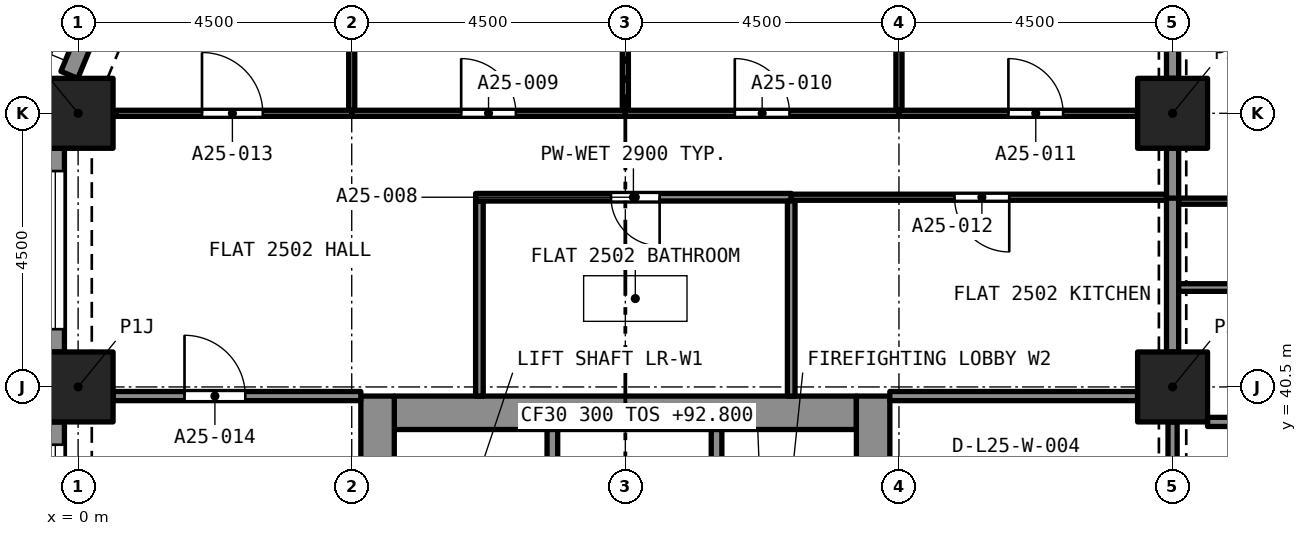
"""IFC4 building model, lengths in metres.
Left out: names, types, materials, properties, quantities, classifications, styles, units other than length and angle.
Written with IfcOpenShell. Run it as: python <this file> out.ifc"""

import sys

from ifc_helpers import new_model, si_unit, direction, frame, frame_2d, origin, origin_2d, place, context, subcontext, project, spatial, rectangle, extrude, element, fill, save


model = new_model("IFC4")
c1 = context("Model", 3, precision=1e-05, world=origin(), true_north=direction((0.0, 1.0)))
c2 = subcontext(c1, "Body", "Model", "MODEL_VIEW")
j1 = project(units=[si_unit("LENGTHUNIT", "METRE"), si_unit("PLANEANGLEUNIT", "RADIAN")], contexts=[c1])
p1 = place(None, origin())
s1 = spatial("IfcSite", under=j1, at=p1, CompositionType="ELEMENT")
p2 = place(p1, origin())
s2 = spatial("IfcBuilding", under=s1, at=p2, CompositionType="ELEMENT")
p3 = place(p2, frame((0.0, 0.0, 92.8)))
s3 = spatial("IfcBuildingStorey", under=s2, at=p3, CompositionType="ELEMENT", Elevation=92.8)
for number, where, z_axis, x_axis in (
    (1, (0.0, 40.5, 0.0), (0.0, 0.0, 1.0), (1.0, 0.0, 0.0)),
    (2, (18.0, 40.5, 0.0), (0.0, 0.0, 1.0), (1.0, 0.0, 0.0)),
    (3, (0.0, 45.0, 0.0), (0.0, 0.0, 1.0), (1.0, 0.0, 0.0)),
    (4, (18.0, 45.0, 0.0), (0.0, 0.0, 1.0), (1.0, 0.0, 0.0)),
):
    element("IfcColumn", number, at=place(p3, frame(where, z_axis=z_axis, x_axis=x_axis)), inside=s3, PredefinedType="COLUMN", context=c2, shape_type="SweptSolid", body=[
        extrude(rectangle(XDim=1.15, YDim=1.15, at=origin_2d()), origin(), (0.0, 0.0, 1.0), 3.2),
    ])
p4 = place(p3, frame((5.2, 40.075, 0.0), z_axis=(0.0, 0.0, 1.0), x_axis=(1.0, 0.0, 0.0)))
e5 = element("IfcWall", 5, at=p4, inside=s3, PredefinedType="SOLIDWALL", context=c2, shape_type="SweptSolid", body=[
    extrude(rectangle(XDim=7.6, YDim=0.55, at=frame_2d((3.8, 0.0))), origin(), (0.0, 0.0, 1.0), 3.2),
])
p5 = place(p3, frame((4.925, 27.15, 0.0), z_axis=(0.0, 0.0, 1.0), x_axis=(0.0, 1.0, 0.0)))
e6 = element("IfcWall", 6, at=p5, inside=s3, PredefinedType="SOLIDWALL", context=c2, shape_type="SweptSolid", body=[
    extrude(rectangle(XDim=13.2, YDim=0.55, at=frame_2d((6.6, 0.0))), origin(), (0.0, 0.0, 1.0), 3.2),
])
p6 = place(p5, frame((8.8, 0.0, 0.0)))
e7 = element("IfcOpeningElement", 7, at=p6, cuts=e6, PredefinedType="OPENING", context=c2, shape_type="SweptSolid", body=[
    extrude(rectangle(XDim=1.2, YDim=2.1, at=frame_2d((0.6, 1.05))), frame((0.0, 0.285, 0.0), z_axis=(0.0, -1.0, 0.0), x_axis=(1.0, 0.0, 0.0)), (0.0, 0.0, 1.0), 0.57),
])
p7 = place(p3, frame((13.075, 27.15, 0.0), z_axis=(0.0, 0.0, 1.0), x_axis=(0.0, 1.0, 0.0)))
e8 = element("IfcWall", 8, at=p7, inside=s3, PredefinedType="SOLIDWALL", context=c2, shape_type="SweptSolid", body=[
    extrude(rectangle(XDim=13.2, YDim=0.55, at=frame_2d((6.6, 0.0))), origin(), (0.0, 0.0, 1.0), 3.2),
])
p8 = place(p7, frame((10.95, 0.0, 0.0)))
e9 = element("IfcOpeningElement", 9, at=p8, cuts=e8, PredefinedType="OPENING", context=c2, shape_type="SweptSolid", body=[
    extrude(rectangle(XDim=1.1, YDim=2.1, at=frame_2d((0.55, 1.05))), frame((0.0, 0.285, 0.0), z_axis=(0.0, -1.0, 0.0), x_axis=(1.0, 0.0, 0.0)), (0.0, 0.0, 1.0), 0.57),
])
p9 = place(p7, frame((8.8, 0.0, 0.0)))
e10 = element("IfcOpeningElement", 10, at=p9, cuts=e8, PredefinedType="OPENING", context=c2, shape_type="SweptSolid", body=[
    extrude(rectangle(XDim=1.2, YDim=2.1, at=frame_2d((0.6, 1.05))), frame((0.0, 0.285, 0.0), z_axis=(0.0, -1.0, 0.0), x_axis=(1.0, 0.0, 0.0)), (0.0, 0.0, 1.0), 0.57),
])
p10 = place(p3, frame((-0.144, 45.632, 0.0), z_axis=(0.0, 0.0, 1.0), x_axis=(0.382723818695, 0.923862802911, 0.0)))
e11 = element("IfcWall", 11, at=p10, inside=s3, PredefinedType="SOLIDWALL", context=c2, shape_type="SweptSolid", body=[
    extrude(rectangle(XDim=2.164, YDim=0.3, at=frame_2d((1.082, 0.0))), origin(), (0.0, 0.0, 1.0), 3.2),
])
p11 = place(p10, frame((0.493, 0.0, 0.45)))
e12 = element("IfcOpeningElement", 12, at=p11, cuts=e11, PredefinedType="OPENING", context=c2, shape_type="SweptSolid", body=[
    extrude(rectangle(XDim=1.4, YDim=1.95, at=frame_2d((0.7, 0.975))), frame((0.0, 0.16, 0.0), z_axis=(0.0, -1.0, 0.0), x_axis=(1.0, 0.0, 0.0)), (0.0, 0.0, 1.0), 0.32),
])
p12 = place(p3, frame((-0.375, 41.075, 0.0), z_axis=(0.0, 0.0, 1.0), x_axis=(0.0, 1.0, 0.0)))
e13 = element("IfcWall", 13, at=p12, inside=s3, PredefinedType="SOLIDWALL", context=c2, shape_type="SweptSolid", body=[
    extrude(rectangle(XDim=3.35, YDim=0.3, at=frame_2d((1.675, 0.0))), origin(), (0.0, 0.0, 1.0), 3.2),
])
p13 = place(p12, frame((0.375, 0.0, 0.45)))
e14 = element("IfcOpeningElement", 14, at=p13, cuts=e13, PredefinedType="OPENING", context=c2, shape_type="SweptSolid", body=[
    extrude(rectangle(XDim=2.6, YDim=1.95, at=frame_2d((1.3, 0.975))), frame((0.0, 0.16, 0.0), z_axis=(0.0, -1.0, 0.0), x_axis=(1.0, 0.0, 0.0)), (0.0, 0.0, 1.0), 0.32),
])
p14 = place(p3, frame((-0.375, 36.575, 0.0), z_axis=(0.0, 0.0, 1.0), x_axis=(0.0, 1.0, 0.0)))
e15 = element("IfcWall", 15, at=p14, inside=s3, PredefinedType="SOLIDWALL", context=c2, shape_type="SweptSolid", body=[
    extrude(rectangle(XDim=3.35, YDim=0.3, at=frame_2d((1.675, 0.0))), origin(), (0.0, 0.0, 1.0), 3.2),
])
p15 = place(p14, frame((0.375, 0.0, 0.45)))
e16 = element("IfcOpeningElement", 16, at=p15, cuts=e15, PredefinedType="OPENING", context=c2, shape_type="SweptSolid", body=[
    extrude(rectangle(XDim=2.6, YDim=1.95, at=frame_2d((1.3, 0.975))), frame((0.0, 0.16, 0.0), z_axis=(0.0, -1.0, 0.0), x_axis=(1.0, 0.0, 0.0)), (0.0, 0.0, 1.0), 0.32),
])
p16 = place(p3, frame((6.6, 40.35, 0.0), z_axis=(0.0, 0.0, 1.0), x_axis=(0.0, 1.0, 0.0)))
e17 = element("IfcWall", 17, at=p16, inside=s3, PredefinedType="PARTITIONING", context=c2, shape_type="SweptSolid", body=[
    extrude(rectangle(XDim=3.208, YDim=0.125, at=frame_2d((1.604, 0.0))), origin(), (0.0, 0.0, 1.0), 2.9),
])
p17 = place(p3, frame((11.728, 43.62, 0.0), z_axis=(0.0, 0.0, 1.0), x_axis=(-1.0, 0.0, 0.0)))
e18 = element("IfcWall", 18, at=p17, inside=s3, PredefinedType="PARTITIONING", context=c2, shape_type="SweptSolid", body=[
    extrude(rectangle(XDim=5.19, YDim=0.125, at=frame_2d((2.595, 0.0))), origin(), (0.0, 0.0, 1.0), 2.9),
])
p18 = place(p17, frame((2.164, 0.0, 0.0)))
e19 = element("IfcOpeningElement", 19, at=p18, cuts=e18, PredefinedType="OPENING", context=c2, shape_type="SweptSolid", body=[
    extrude(rectangle(XDim=0.8, YDim=2.1, at=frame_2d((0.4, 1.05))), frame((0.0, 0.073, 0.0), z_axis=(0.0, -1.0, 0.0), x_axis=(1.0, 0.0, 0.0)), (0.0, 0.0, 1.0), 0.145),
])
p19 = place(p3, frame((11.728, 40.35, 0.0), z_axis=(0.0, 0.0, 1.0), x_axis=(0.0, 1.0, 0.0)))
e20 = element("IfcWall", 20, at=p19, inside=s3, PredefinedType="PARTITIONING", context=c2, shape_type="SweptSolid", body=[
    extrude(rectangle(XDim=3.208, YDim=0.125, at=frame_2d((1.604, 0.0))), origin(), (0.0, 0.0, 1.0), 2.9),
])
p20 = place(p3, frame((9.0, 45.05, 0.0), z_axis=(0.0, 0.0, 1.0), x_axis=(0.0, 1.0, 0.0)))
e21 = element("IfcWall", 21, at=p20, inside=s3, PredefinedType="PARTITIONING", context=c2, shape_type="SweptSolid", body=[
    extrude(rectangle(XDim=3.875, YDim=0.1, at=frame_2d((1.938, 0.0))), origin(), (0.0, 0.0, 1.0), 2.9),
])
p21 = place(p3, frame((4.5, 45.0, 0.0), z_axis=(0.0, 0.0, 1.0), x_axis=(1.0, 0.0, 0.0)))
e22 = element("IfcWall", 22, at=p21, inside=s3, PredefinedType="PARTITIONING", context=c2, shape_type="SweptSolid", body=[
    extrude(rectangle(XDim=4.5, YDim=0.1, at=frame_2d((2.25, 0.0))), origin(), (0.0, 0.0, 1.0), 2.9),
])
p22 = place(p21, frame((1.8, 0.0, 0.0)))
e23 = element("IfcOpeningElement", 23, at=p22, cuts=e22, PredefinedType="OPENING", context=c2, shape_type="SweptSolid", body=[
    extrude(rectangle(XDim=0.9, YDim=2.1, at=frame_2d((0.45, 1.05))), frame((0.0, 0.06, 0.0), z_axis=(0.0, -1.0, 0.0), x_axis=(1.0, 0.0, 0.0)), (0.0, 0.0, 1.0), 0.12),
])
p23 = place(p3, frame((4.5, 45.05, 0.0), z_axis=(0.0, 0.0, 1.0), x_axis=(0.0, 1.0, 0.0)))
e24 = element("IfcWall", 24, at=p23, inside=s3, PredefinedType="PARTITIONING", context=c2, shape_type="SweptSolid", body=[
    extrude(rectangle(XDim=3.828, YDim=0.1, at=frame_2d((1.914, 0.0))), origin(), (0.0, 0.0, 1.0), 2.9),
])
p24 = place(p3, frame((13.5, 45.05, 0.0), z_axis=(0.0, 0.0, 1.0), x_axis=(0.0, 1.0, 0.0)))
e25 = element("IfcWall", 25, at=p24, inside=s3, PredefinedType="PARTITIONING", context=c2, shape_type="SweptSolid", body=[
    extrude(rectangle(XDim=3.875, YDim=0.1, at=frame_2d((1.938, 0.0))), origin(), (0.0, 0.0, 1.0), 2.9),
])
p25 = place(p3, frame((9.0, 45.0, 0.0), z_axis=(0.0, 0.0, 1.0), x_axis=(1.0, 0.0, 0.0)))
e26 = element("IfcWall", 26, at=p25, inside=s3, PredefinedType="PARTITIONING", context=c2, shape_type="SweptSolid", body=[
    extrude(rectangle(XDim=4.5, YDim=0.1, at=frame_2d((2.25, 0.0))), origin(), (0.0, 0.0, 1.0), 2.9),
])
p26 = place(p25, frame((1.8, 0.0, 0.0)))
e27 = element("IfcOpeningElement", 27, at=p26, cuts=e26, PredefinedType="OPENING", context=c2, shape_type="SweptSolid", body=[
    extrude(rectangle(XDim=0.9, YDim=2.1, at=frame_2d((0.45, 1.05))), frame((0.0, 0.06, 0.0), z_axis=(0.0, -1.0, 0.0), x_axis=(1.0, 0.0, 0.0)), (0.0, 0.0, 1.0), 0.12),
])
p27 = place(p3, frame((13.5, 45.0, 0.0), z_axis=(0.0, 0.0, 1.0), x_axis=(1.0, 0.0, 0.0)))
e28 = element("IfcWall", 28, at=p27, inside=s3, PredefinedType="PARTITIONING", context=c2, shape_type="SweptSolid", body=[
    extrude(rectangle(XDim=3.925, YDim=0.1, at=frame_2d((1.962, 0.0))), origin(), (0.0, 0.0, 1.0), 2.9),
])
p28 = place(p27, frame((1.8, 0.0, 0.0)))
e29 = element("IfcOpeningElement", 29, at=p28, cuts=e28, PredefinedType="OPENING", context=c2, shape_type="SweptSolid", body=[
    extrude(rectangle(XDim=0.9, YDim=2.1, at=frame_2d((0.45, 1.05))), frame((0.0, 0.06, 0.0), z_axis=(0.0, -1.0, 0.0), x_axis=(1.0, 0.0, 0.0)), (0.0, 0.0, 1.0), 0.12),
])
p29 = place(p3, frame((18.0, 45.575, 0.0), z_axis=(0.0, 0.0, 1.0), x_axis=(0.0, 1.0, 0.0)))
e30 = element("IfcWall", 30, at=p29, inside=s3, PredefinedType="PARTITIONING", context=c2, shape_type="SweptSolid", body=[
    extrude(rectangle(XDim=3.35, YDim=0.2, at=frame_2d((1.675, 0.0))), origin(), (0.0, 0.0, 1.0), 2.38),
])
p30 = place(p3, frame((17.9, 43.62, 0.0), z_axis=(0.0, 0.0, 1.0), x_axis=(-1.0, 0.0, 0.0)))
e31 = element("IfcWall", 31, at=p30, inside=s3, PredefinedType="PARTITIONING", context=c2, shape_type="SweptSolid", body=[
    extrude(rectangle(XDim=6.172, YDim=0.1, at=frame_2d((3.086, 0.0))), origin(), (0.0, 0.0, 1.0), 2.9),
])
p31 = place(p30, frame((2.586, 0.0, 0.0)))
e32 = element("IfcOpeningElement", 32, at=p31, cuts=e31, PredefinedType="OPENING", context=c2, shape_type="SweptSolid", body=[
    extrude(rectangle(XDim=0.9, YDim=2.1, at=frame_2d((0.45, 1.05))), frame((0.0, 0.06, 0.0), z_axis=(0.0, -1.0, 0.0), x_axis=(1.0, 0.0, 0.0)), (0.0, 0.0, 1.0), 0.12),
])
p32 = place(p3, frame((0.622, 45.0, 0.0), z_axis=(0.0, 0.0, 1.0), x_axis=(1.0, 0.0, 0.0)))
e33 = element("IfcWall", 33, at=p32, inside=s3, PredefinedType="PARTITIONING", context=c2, shape_type="SweptSolid", body=[
    extrude(rectangle(XDim=3.878, YDim=0.1, at=frame_2d((1.939, 0.0))), origin(), (0.0, 0.0, 1.0), 2.9),
])
p33 = place(p32, frame((1.415, 0.0, 0.0)))
e34 = element("IfcOpeningElement", 34, at=p33, cuts=e33, PredefinedType="OPENING", context=c2, shape_type="SweptSolid", body=[
    extrude(rectangle(XDim=1.0, YDim=2.1, at=frame_2d((0.5, 1.05))), frame((0.0, 0.06, 0.0), z_axis=(0.0, -1.0, 0.0), x_axis=(1.0, 0.0, 0.0)), (0.0, 0.0, 1.0), 0.12),
])
p34 = place(p3, frame((18.0, 43.57, 0.0), z_axis=(0.0, 0.0, 1.0), x_axis=(0.0, 1.0, 0.0)))
e35 = element("IfcWall", 35, at=p34, inside=s3, PredefinedType="PARTITIONING", context=c2, shape_type="SweptSolid", body=[
    extrude(rectangle(XDim=0.855, YDim=0.2, at=frame_2d((0.427, 0.0))), origin(), (0.0, 0.0, 1.0), 2.38),
])
p35 = place(p3, frame((0.575, 40.35, 0.0), z_axis=(0.0, 0.0, 1.0), x_axis=(1.0, 0.0, 0.0)))
e36 = element("IfcWall", 36, at=p35, inside=s3, PredefinedType="PARTITIONING", context=c2, shape_type="SweptSolid", body=[
    extrude(rectangle(XDim=4.075, YDim=0.15, at=frame_2d((2.038, 0.0))), origin(), (0.0, 0.0, 1.0), 2.9),
])
p36 = place(p35, frame((1.175, 0.0, 0.0)))
e37 = element("IfcOpeningElement", 37, at=p36, cuts=e36, PredefinedType="OPENING", context=c2, shape_type="SweptSolid", body=[
    extrude(rectangle(XDim=1.0, YDim=2.1, at=frame_2d((0.5, 1.05))), frame((0.0, 0.085, 0.0), z_axis=(0.0, -1.0, 0.0), x_axis=(1.0, 0.0, 0.0)), (0.0, 0.0, 1.0), 0.17),
])
p37 = place(p3, frame((18.0, 41.075, 0.0), z_axis=(0.0, 0.0, 1.0), x_axis=(0.0, 1.0, 0.0)))
e38 = element("IfcWall", 38, at=p37, inside=s3, PredefinedType="PARTITIONING", context=c2, shape_type="SweptSolid", body=[
    extrude(rectangle(XDim=2.53, YDim=0.2, at=frame_2d((1.265, 0.0))), origin(), (0.0, 0.0, 1.0), 2.38),
])
p38 = place(p3, frame((13.35, 40.35, 0.0), z_axis=(0.0, 0.0, 1.0), x_axis=(1.0, 0.0, 0.0)))
e39 = element("IfcWall", 39, at=p38, inside=s3, PredefinedType="PARTITIONING", context=c2, shape_type="SweptSolid", body=[
    extrude(rectangle(XDim=4.075, YDim=0.15, at=frame_2d((2.038, 0.0))), origin(), (0.0, 0.0, 1.0), 2.9),
])
p39 = place(p3, frame((20.762, 42.135, 0.0), z_axis=(0.0, 0.0, 1.0), x_axis=(-1.0, 0.0, 0.0)))
e40 = element("IfcWall", 40, at=p39, inside=s3, PredefinedType="PARTITIONING", context=c2, shape_type="SweptSolid", body=[
    extrude(rectangle(XDim=2.662, YDim=0.125, at=frame_2d((1.331, 0.0))), origin(), (0.0, 0.0, 1.0), 2.75),
])
p40 = place(p39, frame((1.012, 0.0, 0.0)))
e41 = element("IfcOpeningElement", 41, at=p40, cuts=e40, PredefinedType="OPENING", context=c2, shape_type="SweptSolid", body=[
    extrude(rectangle(XDim=0.8, YDim=2.1, at=frame_2d((0.4, 1.05))), frame((0.0, 0.073, 0.0), z_axis=(0.0, -1.0, 0.0), x_axis=(1.0, 0.0, 0.0)), (0.0, 0.0, 1.0), 0.145),
])
p41 = place(p3, frame((18.575, 39.925, 0.0), z_axis=(0.0, 0.0, 1.0), x_axis=(1.0, 0.0, 0.0)))
e42 = element("IfcWall", 42, at=p41, inside=s3, PredefinedType="PARTITIONING", context=c2, shape_type="SweptSolid", body=[
    extrude(rectangle(XDim=2.125, YDim=0.15, at=frame_2d((1.062, 0.0))), origin(), (0.0, 0.0, 1.0), 2.75),
])
p42 = place(p3, frame((18.1, 43.555, 0.0), z_axis=(0.0, 0.0, 1.0), x_axis=(1.0, 0.0, 0.0)))
e43 = element("IfcWall", 43, at=p42, inside=s3, PredefinedType="PARTITIONING", context=c2, shape_type="SweptSolid", body=[
    extrude(rectangle(XDim=4.4, YDim=0.1, at=frame_2d((2.2, 0.0))), origin(), (0.0, 0.0, 1.0), 2.75),
])
p43 = place(p42, frame((1.65, 0.0, 0.0)))
e44 = element("IfcOpeningElement", 44, at=p43, cuts=e43, PredefinedType="OPENING", context=c2, shape_type="SweptSolid", body=[
    extrude(rectangle(XDim=1.0, YDim=2.1, at=frame_2d((0.5, 1.05))), frame((0.0, 0.06, 0.0), z_axis=(0.0, -1.0, 0.0), x_axis=(1.0, 0.0, 0.0)), (0.0, 0.0, 1.0), 0.12),
])
p44 = place(p3, frame((18.0, 39.925, 0.0), z_axis=(0.0, 0.0, 1.0), x_axis=(0.0, -1.0, 0.0)))
e45 = element("IfcWall", 45, at=p44, inside=s3, PredefinedType="PARTITIONING", context=c2, shape_type="SweptSolid", body=[
    extrude(rectangle(XDim=3.35, YDim=0.15, at=frame_2d((1.675, 0.0))), origin(), (0.0, 0.0, 1.0), 2.38),
])
p45 = place(p44, frame((1.075, 0.0, 0.0)))
e46 = element("IfcOpeningElement", 46, at=p45, cuts=e45, PredefinedType="OPENING", context=c2, shape_type="SweptSolid", body=[
    extrude(rectangle(XDim=1.2, YDim=2.1, at=frame_2d((0.6, 1.05))), frame((0.0, 0.085, 0.0), z_axis=(0.0, -1.0, 0.0), x_axis=(1.0, 0.0, 0.0)), (0.0, 0.0, 1.0), 0.17),
])
p46 = place(p3, frame((7.8, 37.5, 0.0), z_axis=(0.0, 0.0, 1.0), x_axis=(0.0, 1.0, 0.0)))
e47 = element("IfcWall", 47, at=p46, inside=s3, PredefinedType="SOLIDWALL", context=c2, shape_type="SweptSolid", body=[
    extrude(rectangle(XDim=2.3, YDim=0.175, at=frame_2d((1.15, 0.0))), origin(), (0.0, 0.0, 1.0), 2.9),
])
p47 = place(p3, frame((10.5, 37.5, 0.0), z_axis=(0.0, 0.0, 1.0), x_axis=(0.0, 1.0, 0.0)))
e48 = element("IfcWall", 48, at=p47, inside=s3, PredefinedType="SOLIDWALL", context=c2, shape_type="SweptSolid", body=[
    extrude(rectangle(XDim=2.3, YDim=0.175, at=frame_2d((1.15, 0.0))), origin(), (0.0, 0.0, 1.0), 2.9),
])
p48 = place(p47, frame((0.65, 0.0, 0.0)))
e49 = element("IfcOpeningElement", 49, at=p48, cuts=e48, PredefinedType="OPENING", context=c2, shape_type="SweptSolid", body=[
    extrude(rectangle(XDim=1.0, YDim=2.1, at=frame_2d((0.5, 1.05))), frame((0.0, 0.097, 0.0), z_axis=(0.0, -1.0, 0.0), x_axis=(1.0, 0.0, 0.0)), (0.0, 0.0, 1.0), 0.195),
])
p49 = place(p13, origin())
e50 = element("IfcWindow", 50, at=p49, inside=s3, PartitioningType="SINGLE_PANEL", PredefinedType="WINDOW", context=c2, shape_type="SweptSolid", body=[
    extrude(rectangle(XDim=2.6, YDim=1.95, at=frame_2d((1.3, 0.975))), frame((0.0, 0.03, 0.0), z_axis=(0.0, -1.0, 0.0), x_axis=(1.0, 0.0, 0.0)), (0.0, 0.0, 1.0), 0.06),
])
fill(e14, e50)
p50 = place(p15, origin())
e51 = element("IfcWindow", 51, at=p50, inside=s3, PartitioningType="SINGLE_PANEL", PredefinedType="WINDOW", context=c2, shape_type="SweptSolid", body=[
    extrude(rectangle(XDim=2.6, YDim=1.95, at=frame_2d((1.3, 0.975))), frame((0.0, 0.03, 0.0), z_axis=(0.0, -1.0, 0.0), x_axis=(1.0, 0.0, 0.0)), (0.0, 0.0, 1.0), 0.06),
])
fill(e16, e51)
p51 = place(p18, origin())
e52 = element("IfcDoor", 52, at=p51, inside=s3, OperationType="SINGLE_SWING_LEFT", PredefinedType="DOOR", context=c2, shape_type="SweptSolid", body=[
    extrude(rectangle(XDim=0.8, YDim=2.1, at=frame_2d((0.4, 1.05))), frame((0.0, 0.025, 0.0), z_axis=(0.0, -1.0, 0.0), x_axis=(1.0, 0.0, 0.0)), (0.0, 0.0, 1.0), 0.05),
])
fill(e19, e52)
p52 = place(p22, origin())
e53 = element("IfcDoor", 53, at=p52, inside=s3, OperationType="SINGLE_SWING_RIGHT", PredefinedType="DOOR", context=c2, shape_type="SweptSolid", body=[
    extrude(rectangle(XDim=0.9, YDim=2.1, at=frame_2d((0.45, 1.05))), frame((0.0, 0.025, 0.0), z_axis=(0.0, -1.0, 0.0), x_axis=(1.0, 0.0, 0.0)), (0.0, 0.0, 1.0), 0.05),
])
fill(e23, e53)
p53 = place(p26, origin())
e54 = element("IfcDoor", 54, at=p53, inside=s3, OperationType="SINGLE_SWING_LEFT", PredefinedType="DOOR", context=c2, shape_type="SweptSolid", body=[
    extrude(rectangle(XDim=0.9, YDim=2.1, at=frame_2d((0.45, 1.05))), frame((0.0, 0.025, 0.0), z_axis=(0.0, -1.0, 0.0), x_axis=(1.0, 0.0, 0.0)), (0.0, 0.0, 1.0), 0.05),
])
fill(e27, e54)
p54 = place(p28, origin())
e55 = element("IfcDoor", 55, at=p54, inside=s3, OperationType="SINGLE_SWING_RIGHT", PredefinedType="DOOR", context=c2, shape_type="SweptSolid", body=[
    extrude(rectangle(XDim=0.9, YDim=2.1, at=frame_2d((0.45, 1.05))), frame((0.0, 0.025, 0.0), z_axis=(0.0, -1.0, 0.0), x_axis=(1.0, 0.0, 0.0)), (0.0, 0.0, 1.0), 0.05),
])
fill(e29, e55)
p55 = place(p31, origin())
e56 = element("IfcDoor", 56, at=p55, inside=s3, OperationType="SINGLE_SWING_LEFT", PredefinedType="DOOR", context=c2, shape_type="SweptSolid", body=[
    extrude(rectangle(XDim=0.9, YDim=2.1, at=frame_2d((0.45, 1.05))), frame((0.0, 0.025, 0.0), z_axis=(0.0, -1.0, 0.0), x_axis=(1.0, 0.0, 0.0)), (0.0, 0.0, 1.0), 0.05),
])
fill(e32, e56)
p56 = place(p33, origin())
e57 = element("IfcDoor", 57, at=p56, inside=s3, OperationType="SINGLE_SWING_LEFT", PredefinedType="DOOR", context=c2, shape_type="SweptSolid", body=[
    extrude(rectangle(XDim=1.0, YDim=2.1, at=frame_2d((0.5, 1.05))), frame((0.0, 0.025, 0.0), z_axis=(0.0, -1.0, 0.0), x_axis=(1.0, 0.0, 0.0)), (0.0, 0.0, 1.0), 0.05),
])
fill(e34, e57)
p57 = place(p36, origin())
e58 = element("IfcDoor", 58, at=p57, inside=s3, OperationType="SINGLE_SWING_LEFT", PredefinedType="DOOR", context=c2, shape_type="SweptSolid", body=[
    extrude(rectangle(XDim=1.0, YDim=2.1, at=frame_2d((0.5, 1.05))), frame((0.0, 0.025, 0.0), z_axis=(0.0, -1.0, 0.0), x_axis=(1.0, 0.0, 0.0)), (0.0, 0.0, 1.0), 0.05),
])
fill(e37, e58)
save(model, sys.argv[1])
